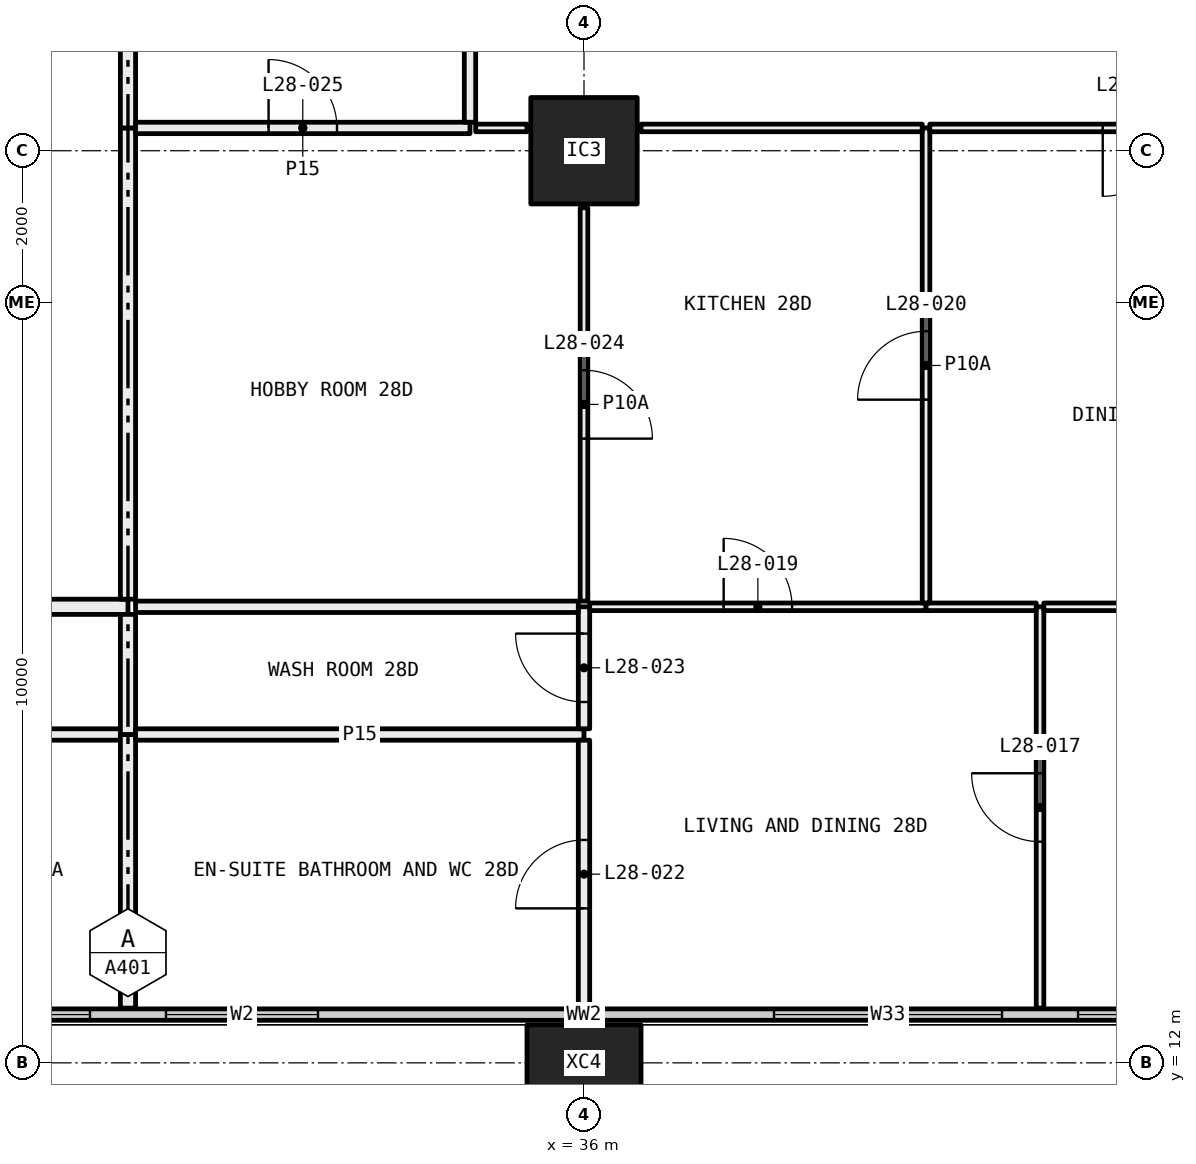
"""IFC4 building model, lengths in metres.
Left out: names, types, materials, properties, quantities, classifications, styles, units other than length and angle.
Written with IfcOpenShell. Run it as: python <this file> out.ifc"""

import sys

from ifc_helpers import new_model, si_unit, direction, frame, frame_2d, origin, origin_2d, place, context, subcontext, project, spatial, rectangle, hollow_rectangle, extrude, element, fill, save


model = new_model("IFC4")
c1 = context("Model", 3, precision=1e-05, world=origin(), true_north=direction((0.0, 1.0)))
c2 = subcontext(c1, "Body", "Model", "MODEL_VIEW")
j1 = project(units=[si_unit("LENGTHUNIT", "METRE"), si_unit("PLANEANGLEUNIT", "RADIAN")], contexts=[c1])
p1 = place(None, origin())
s1 = spatial("IfcSite", under=j1, at=p1, CompositionType="ELEMENT")
p2 = place(p1, origin())
s2 = spatial("IfcBuilding", under=s1, at=p2, CompositionType="ELEMENT")
p3 = place(p2, frame((0.0, 0.0, 110.4)))
s3 = spatial("IfcBuildingStorey", under=s2, at=p3, CompositionType="ELEMENT", Elevation=110.4)
p4 = place(p3, frame((36.0, 12.0, -0.4), z_axis=(0.0, 0.0, 1.0), x_axis=(1.0, 0.0, 0.0)))
e1 = element("IfcColumn", 1, at=p4, inside=s3, PredefinedType="COLUMN", context=c2, shape_type="SweptSolid", body=[
    extrude(hollow_rectangle(XDim=1.5, YDim=1.0, WallThickness=0.06, at=origin_2d()), origin(), (0.0, 0.0, 1.0), 3.45),
])
p5 = place(p3, frame((36.0, 24.0, 0.0), z_axis=(0.0, 0.0, 1.0), x_axis=(1.0, 0.0, 0.0)))
e2 = element("IfcColumn", 2, at=p5, inside=s3, PredefinedType="COLUMN", context=c2, shape_type="SweptSolid", body=[
    extrude(hollow_rectangle(XDim=1.4, YDim=1.4, WallThickness=0.06, at=origin_2d()), origin(), (0.0, 0.0, 1.0), 3.05),
])
p6 = place(p3, frame((6.56, 12.635, 0.0), z_axis=(0.0, 0.0, 1.0), x_axis=(1.0, 0.0, 0.0)))
e3 = element("IfcWall", 3, at=p6, inside=s3, PredefinedType="ELEMENTEDWALL", context=c2, shape_type="SweptSolid", body=[
    extrude(rectangle(XDim=58.88, YDim=0.15, at=frame_2d((29.44, 0.0))), origin(), (0.0, 0.0, 1.0), 3.05),
])
p7 = place(p6, frame((0.44, 0.0, 0.45)))
e4 = element("IfcOpeningElement", 4, at=p7, cuts=e3, PredefinedType="OPENING", context=c2, shape_type="SweptSolid", body=[
    extrude(rectangle(XDim=4.5, YDim=2.55, at=frame_2d((2.25, 1.275))), frame((0.0, 0.085, 0.0), z_axis=(0.0, -1.0, 0.0), x_axis=(1.0, 0.0, 0.0)), (0.0, 0.0, 1.0), 0.17),
])
p8 = place(p6, frame((7.94, 0.0, 0.45)))
e5 = element("IfcOpeningElement", 5, at=p8, cuts=e3, PredefinedType="OPENING", context=c2, shape_type="SweptSolid", body=[
    extrude(rectangle(XDim=3.0, YDim=2.55, at=frame_2d((1.5, 1.275))), frame((0.0, 0.085, 0.0), z_axis=(0.0, -1.0, 0.0), x_axis=(1.0, 0.0, 0.0)), (0.0, 0.0, 1.0), 0.17),
])
p9 = place(p6, frame((11.94, 0.0, 0.45)))
e6 = element("IfcOpeningElement", 6, at=p9, cuts=e3, PredefinedType="OPENING", context=c2, shape_type="SweptSolid", body=[
    extrude(rectangle(XDim=3.0, YDim=2.55, at=frame_2d((1.5, 1.275))), frame((0.0, 0.085, 0.0), z_axis=(0.0, -1.0, 0.0), x_axis=(1.0, 0.0, 0.0)), (0.0, 0.0, 1.0), 0.17),
])
p10 = place(p6, frame((19.94, 0.0, 0.45)))
e7 = element("IfcOpeningElement", 7, at=p10, cuts=e3, PredefinedType="OPENING", context=c2, shape_type="SweptSolid", body=[
    extrude(rectangle(XDim=3.0, YDim=2.55, at=frame_2d((1.5, 1.275))), frame((0.0, 0.085, 0.0), z_axis=(0.0, -1.0, 0.0), x_axis=(1.0, 0.0, 0.0)), (0.0, 0.0, 1.0), 0.17),
])
p11 = place(p6, frame((23.94, 0.0, 0.45)))
e8 = element("IfcOpeningElement", 8, at=p11, cuts=e3, PredefinedType="OPENING", context=c2, shape_type="SweptSolid", body=[
    extrude(rectangle(XDim=2.0, YDim=2.55, at=frame_2d((1.0, 1.275))), frame((0.0, 0.085, 0.0), z_axis=(0.0, -1.0, 0.0), x_axis=(1.0, 0.0, 0.0)), (0.0, 0.0, 1.0), 0.17),
])
p12 = place(p6, frame((31.94, 0.0, 0.45)))
e9 = element("IfcOpeningElement", 9, at=p12, cuts=e3, PredefinedType="OPENING", context=c2, shape_type="SweptSolid", body=[
    extrude(rectangle(XDim=3.0, YDim=2.55, at=frame_2d((1.5, 1.275))), frame((0.0, 0.085, 0.0), z_axis=(0.0, -1.0, 0.0), x_axis=(1.0, 0.0, 0.0)), (0.0, 0.0, 1.0), 0.17),
])
p13 = place(p6, frame((35.94, 0.0, 0.45)))
e10 = element("IfcOpeningElement", 10, at=p13, cuts=e3, PredefinedType="OPENING", context=c2, shape_type="SweptSolid", body=[
    extrude(rectangle(XDim=3.0, YDim=2.55, at=frame_2d((1.5, 1.275))), frame((0.0, 0.085, 0.0), z_axis=(0.0, -1.0, 0.0), x_axis=(1.0, 0.0, 0.0)), (0.0, 0.0, 1.0), 0.17),
])
p14 = place(p6, frame((43.94, 0.0, 0.45)))
e11 = element("IfcOpeningElement", 11, at=p14, cuts=e3, PredefinedType="OPENING", context=c2, shape_type="SweptSolid", body=[
    extrude(rectangle(XDim=3.0, YDim=2.55, at=frame_2d((1.5, 1.275))), frame((0.0, 0.085, 0.0), z_axis=(0.0, -1.0, 0.0), x_axis=(1.0, 0.0, 0.0)), (0.0, 0.0, 1.0), 0.17),
])
p15 = place(p6, frame((47.94, 0.0, 0.45)))
e12 = element("IfcOpeningElement", 12, at=p15, cuts=e3, PredefinedType="OPENING", context=c2, shape_type="SweptSolid", body=[
    extrude(rectangle(XDim=2.0, YDim=2.55, at=frame_2d((1.0, 1.275))), frame((0.0, 0.085, 0.0), z_axis=(0.0, -1.0, 0.0), x_axis=(1.0, 0.0, 0.0)), (0.0, 0.0, 1.0), 0.17),
])
p16 = place(p6, frame((53.94, 0.0, 0.45)))
e13 = element("IfcOpeningElement", 13, at=p16, cuts=e3, PredefinedType="OPENING", context=c2, shape_type="SweptSolid", body=[
    extrude(rectangle(XDim=4.5, YDim=2.55, at=frame_2d((2.25, 1.275))), frame((0.0, 0.085, 0.0), z_axis=(0.0, -1.0, 0.0), x_axis=(1.0, 0.0, 0.0)), (0.0, 0.0, 1.0), 0.17),
])
p17 = place(p3, frame((29.9, 16.32, 0.0), z_axis=(0.0, 0.0, 1.0), x_axis=(-1.0, 0.0, 0.0)))
e14 = element("IfcWall", 14, at=p17, inside=s3, PredefinedType="PARTITIONING", context=c2, shape_type="SweptSolid", body=[
    extrude(rectangle(XDim=5.825, YDim=0.15, at=frame_2d((2.913, 0.0))), origin(), (0.0, 0.0, 1.0), 3.05),
])
p18 = place(p3, frame((30.0, 12.72, 0.0), z_axis=(0.0, 0.0, 1.0), x_axis=(0.0, 1.0, 0.0)))
e15 = element("IfcWall", 15, at=p18, inside=s3, PredefinedType="PARTITIONING", context=c2, shape_type="SweptSolid", body=[
    extrude(rectangle(XDim=3.6, YDim=0.2, at=frame_2d((1.8, 0.0))), origin(), (0.0, 0.0, 1.0), 3.05),
])
p19 = place(p3, frame((30.0, 18.0, 0.0), z_axis=(0.0, 0.0, 1.0), x_axis=(-1.0, 0.0, 0.0)))
e16 = element("IfcWall", 16, at=p19, inside=s3, PredefinedType="PARTITIONING", context=c2, shape_type="SweptSolid", body=[
    extrude(rectangle(XDim=4.1, YDim=0.2, at=frame_2d((2.05, 0.0))), origin(), (0.0, 0.0, 1.0), 3.05),
])
p20 = place(p3, frame((30.0, 16.32, 0.0), z_axis=(0.0, 0.0, 1.0), x_axis=(0.0, 1.0, 0.0)))
e17 = element("IfcWall", 17, at=p20, inside=s3, PredefinedType="PARTITIONING", context=c2, shape_type="SweptSolid", body=[
    extrude(rectangle(XDim=1.58, YDim=0.2, at=frame_2d((0.79, 0.0))), origin(), (0.0, 0.0, 1.0), 3.05),
])
p21 = place(p3, frame((30.0, 18.1, 0.0), z_axis=(0.0, 0.0, 1.0), x_axis=(0.0, 1.0, 0.0)))
e18 = element("IfcWall", 18, at=p21, inside=s3, PredefinedType="PARTITIONING", context=c2, shape_type="SweptSolid", body=[
    extrude(rectangle(XDim=6.2, YDim=0.2, at=frame_2d((3.1, 0.0))), origin(), (0.0, 0.0, 1.0), 2.45),
])
p22 = place(p3, frame((30.0, 24.3, 0.0), z_axis=(0.0, 0.0, 1.0), x_axis=(0.0, 1.0, 0.0)))
e19 = element("IfcWall", 19, at=p22, inside=s3, PredefinedType="PARTITIONING", context=c2, shape_type="SweptSolid", body=[
    extrude(rectangle(XDim=4.5, YDim=0.2, at=frame_2d((2.25, 0.0))), origin(), (0.0, 0.0, 1.0), 3.05),
])
p23 = place(p3, frame((36.0, 16.32, 0.0), z_axis=(0.0, 0.0, 1.0), x_axis=(-1.0, 0.0, 0.0)))
e20 = element("IfcWall", 20, at=p23, inside=s3, PredefinedType="PARTITIONING", context=c2, shape_type="SweptSolid", body=[
    extrude(rectangle(XDim=5.9, YDim=0.15, at=frame_2d((2.95, 0.0))), origin(), (0.0, 0.0, 1.0), 2.45),
])
p24 = place(p3, frame((36.0, 12.72, 0.0), z_axis=(0.0, 0.0, 1.0), x_axis=(0.0, 1.0, 0.0)))
e21 = element("IfcWall", 21, at=p24, inside=s3, PredefinedType="PARTITIONING", context=c2, shape_type="SweptSolid", body=[
    extrude(rectangle(XDim=3.525, YDim=0.15, at=frame_2d((1.763, 0.0))), origin(), (0.0, 0.0, 1.0), 2.45),
])
p25 = place(p24, frame((1.312, 0.0, 0.0)))
e22 = element("IfcOpeningElement", 22, at=p25, cuts=e21, PredefinedType="OPENING", context=c2, shape_type="SweptSolid", body=[
    extrude(rectangle(XDim=0.9, YDim=2.1, at=frame_2d((0.45, 1.05))), frame((0.0, 0.085, 0.0), z_axis=(0.0, -1.0, 0.0), x_axis=(1.0, 0.0, 0.0)), (0.0, 0.0, 1.0), 0.17),
])
p26 = place(p3, frame((36.0, 16.395, 0.0), z_axis=(0.0, 0.0, 1.0), x_axis=(0.0, 1.0, 0.0)))
e23 = element("IfcWall", 23, at=p26, inside=s3, PredefinedType="PARTITIONING", context=c2, shape_type="SweptSolid", body=[
    extrude(rectangle(XDim=1.605, YDim=0.15, at=frame_2d((0.802, 0.0))), origin(), (0.0, 0.0, 1.0), 2.45),
])
p27 = place(p26, frame((0.353, 0.0, 0.0)))
e24 = element("IfcOpeningElement", 24, at=p27, cuts=e23, PredefinedType="OPENING", context=c2, shape_type="SweptSolid", body=[
    extrude(rectangle(XDim=0.9, YDim=2.1, at=frame_2d((0.45, 1.05))), frame((0.0, 0.085, 0.0), z_axis=(0.0, -1.0, 0.0), x_axis=(1.0, 0.0, 0.0)), (0.0, 0.0, 1.0), 0.17),
])
p28 = place(p3, frame((35.925, 18.0, 0.0), z_axis=(0.0, 0.0, 1.0), x_axis=(-1.0, 0.0, 0.0)))
e25 = element("IfcWall", 25, at=p28, inside=s3, PredefinedType="PARTITIONING", context=c2, shape_type="SweptSolid", body=[
    extrude(rectangle(XDim=5.825, YDim=0.15, at=frame_2d((2.913, 0.0))), origin(), (0.0, 0.0, 1.0), 2.45),
])
p29 = place(p3, frame((42.0, 12.72, 0.0), z_axis=(0.0, 0.0, 1.0), x_axis=(0.0, 1.0, 0.0)))
e26 = element("IfcWall", 26, at=p29, inside=s3, PredefinedType="PARTITIONING", context=c2, shape_type="SweptSolid", body=[
    extrude(rectangle(XDim=5.28, YDim=0.1, at=frame_2d((2.64, 0.0))), origin(), (0.0, 0.0, 1.0), 3.05),
])
p30 = place(p29, frame((2.19, 0.0, 0.0)))
e27 = element("IfcOpeningElement", 27, at=p30, cuts=e26, PredefinedType="OPENING", context=c2, shape_type="SweptSolid", body=[
    extrude(rectangle(XDim=0.9, YDim=2.1, at=frame_2d((0.45, 1.05))), frame((0.0, 0.06, 0.0), z_axis=(0.0, -1.0, 0.0), x_axis=(1.0, 0.0, 0.0)), (0.0, 0.0, 1.0), 0.12),
])
p31 = place(p3, frame((40.5, 18.0, 0.0), z_axis=(0.0, 0.0, 1.0), x_axis=(-1.0, 0.0, 0.0)))
e28 = element("IfcWall", 28, at=p31, inside=s3, PredefinedType="PARTITIONING", context=c2, shape_type="SweptSolid", body=[
    extrude(rectangle(XDim=4.425, YDim=0.1, at=frame_2d((2.212, 0.0))), origin(), (0.0, 0.0, 1.0), 2.45),
])
p32 = place(p31, frame((1.762, 0.0, 0.0)))
e29 = element("IfcOpeningElement", 29, at=p32, cuts=e28, PredefinedType="OPENING", context=c2, shape_type="SweptSolid", body=[
    extrude(rectangle(XDim=0.9, YDim=2.1, at=frame_2d((0.45, 1.05))), frame((0.0, 0.06, 0.0), z_axis=(0.0, -1.0, 0.0), x_axis=(1.0, 0.0, 0.0)), (0.0, 0.0, 1.0), 0.12),
])
p33 = place(p3, frame((41.95, 18.0, 0.0), z_axis=(0.0, 0.0, 1.0), x_axis=(-1.0, 0.0, 0.0)))
e30 = element("IfcWall", 30, at=p33, inside=s3, PredefinedType="PARTITIONING", context=c2, shape_type="SweptSolid", body=[
    extrude(rectangle(XDim=1.45, YDim=0.1, at=frame_2d((0.725, 0.0))), origin(), (0.0, 0.0, 1.0), 3.05),
])
p34 = place(p3, frame((46.0, 18.0, 0.0), z_axis=(0.0, 0.0, 1.0), x_axis=(-1.0, 0.0, 0.0)))
e31 = element("IfcWall", 31, at=p34, inside=s3, PredefinedType="PARTITIONING", context=c2, shape_type="SweptSolid", body=[
    extrude(rectangle(XDim=3.95, YDim=0.1, at=frame_2d((1.975, 0.0))), origin(), (0.0, 0.0, 1.0), 3.05),
])
p35 = place(p3, frame((36.0, 18.075, 0.0), z_axis=(0.0, 0.0, 1.0), x_axis=(0.0, 1.0, 0.0)))
e32 = element("IfcWall", 32, at=p35, inside=s3, PredefinedType="PARTITIONING", context=c2, shape_type="SweptSolid", body=[
    extrude(rectangle(XDim=5.175, YDim=0.1, at=frame_2d((2.587, 0.0))), origin(), (0.0, 0.0, 1.0), 2.45),
])
p36 = place(p35, frame((2.137, 0.0, 0.0)))
e33 = element("IfcOpeningElement", 33, at=p36, cuts=e32, PredefinedType="OPENING", context=c2, shape_type="SweptSolid", body=[
    extrude(rectangle(XDim=0.9, YDim=2.1, at=frame_2d((0.45, 1.05))), frame((0.0, 0.06, 0.0), z_axis=(0.0, -1.0, 0.0), x_axis=(1.0, 0.0, 0.0)), (0.0, 0.0, 1.0), 0.12),
])
p37 = place(p3, frame((34.5, 24.3, 0.0), z_axis=(0.0, 0.0, 1.0), x_axis=(-1.0, 0.0, 0.0)))
e34 = element("IfcWall", 34, at=p37, inside=s3, PredefinedType="PARTITIONING", context=c2, shape_type="SweptSolid", body=[
    extrude(rectangle(XDim=4.4, YDim=0.15, at=frame_2d((2.2, 0.0))), origin(), (0.0, 0.0, 1.0), 3.05),
])
p38 = place(p37, frame((1.75, 0.0, 0.0)))
e35 = element("IfcOpeningElement", 35, at=p38, cuts=e34, PredefinedType="OPENING", context=c2, shape_type="SweptSolid", body=[
    extrude(rectangle(XDim=0.9, YDim=2.1, at=frame_2d((0.45, 1.05))), frame((0.0, 0.085, 0.0), z_axis=(0.0, -1.0, 0.0), x_axis=(1.0, 0.0, 0.0)), (0.0, 0.0, 1.0), 0.17),
])
p39 = place(p3, frame((35.25, 24.3, 0.0), z_axis=(0.0, 0.0, 1.0), x_axis=(-1.0, 0.0, 0.0)))
e36 = element("IfcWall", 36, at=p39, inside=s3, PredefinedType="PARTITIONING", context=c2, shape_type="SweptSolid", body=[
    extrude(rectangle(XDim=0.675, YDim=0.1, at=frame_2d((0.337, 0.0))), origin(), (0.0, 0.0, 1.0), 3.05),
])
p40 = place(p3, frame((40.5, 18.05, 0.0), z_axis=(0.0, 0.0, 1.0), x_axis=(0.0, 1.0, 0.0)))
e37 = element("IfcWall", 37, at=p40, inside=s3, PredefinedType="PARTITIONING", context=c2, shape_type="SweptSolid", body=[
    extrude(rectangle(XDim=6.25, YDim=0.1, at=frame_2d((3.125, 0.0))), origin(), (0.0, 0.0, 1.0), 2.45),
])
p41 = place(p40, frame((2.675, 0.0, 0.0)))
e38 = element("IfcOpeningElement", 38, at=p41, cuts=e37, PredefinedType="OPENING", context=c2, shape_type="SweptSolid", body=[
    extrude(rectangle(XDim=0.9, YDim=2.1, at=frame_2d((0.45, 1.05))), frame((0.0, 0.06, 0.0), z_axis=(0.0, -1.0, 0.0), x_axis=(1.0, 0.0, 0.0)), (0.0, 0.0, 1.0), 0.12),
])
p42 = place(p3, frame((40.45, 24.3, 0.0), z_axis=(0.0, 0.0, 1.0), x_axis=(-1.0, 0.0, 0.0)))
e39 = element("IfcWall", 39, at=p42, inside=s3, PredefinedType="PARTITIONING", context=c2, shape_type="SweptSolid", body=[
    extrude(rectangle(XDim=3.7, YDim=0.1, at=frame_2d((1.85, 0.0))), origin(), (0.0, 0.0, 1.0), 3.05),
])
p43 = place(p3, frame((46.0, 24.3, 0.0), z_axis=(0.0, 0.0, 1.0), x_axis=(-1.0, 0.0, 0.0)))
e40 = element("IfcWall", 40, at=p43, inside=s3, PredefinedType="PARTITIONING", context=c2, shape_type="SweptSolid", body=[
    extrude(rectangle(XDim=5.45, YDim=0.1, at=frame_2d((2.725, 0.0))), origin(), (0.0, 0.0, 1.0), 3.05),
])
p44 = place(p43, frame((2.275, 0.0, 0.0)))
e41 = element("IfcOpeningElement", 41, at=p44, cuts=e40, PredefinedType="OPENING", context=c2, shape_type="SweptSolid", body=[
    extrude(rectangle(XDim=0.9, YDim=2.1, at=frame_2d((0.45, 1.05))), frame((0.0, 0.06, 0.0), z_axis=(0.0, -1.0, 0.0), x_axis=(1.0, 0.0, 0.0)), (0.0, 0.0, 1.0), 0.12),
])
p45 = place(p3, frame((34.5, 24.375, 0.0), z_axis=(0.0, 0.0, 1.0), x_axis=(0.0, 1.0, 0.0)))
e42 = element("IfcWall", 42, at=p45, inside=s3, PredefinedType="PARTITIONING", context=c2, shape_type="SweptSolid", body=[
    extrude(rectangle(XDim=4.325, YDim=0.15, at=frame_2d((2.163, 0.0))), origin(), (0.0, 0.0, 1.0), 3.05),
])
p46 = place(p10, origin())
e43 = element("IfcWindow", 43, at=p46, inside=s3, PartitioningType="SINGLE_PANEL", PredefinedType="WINDOW", context=c2, shape_type="SweptSolid", body=[
    extrude(rectangle(XDim=3.0, YDim=2.55, at=frame_2d((1.5, 1.275))), frame((0.0, 0.03, 0.0), z_axis=(0.0, -1.0, 0.0), x_axis=(1.0, 0.0, 0.0)), (0.0, 0.0, 1.0), 0.06),
])
fill(e7, e43)
p47 = place(p11, origin())
e44 = element("IfcWindow", 44, at=p47, inside=s3, PartitioningType="SINGLE_PANEL", PredefinedType="WINDOW", context=c2, shape_type="SweptSolid", body=[
    extrude(rectangle(XDim=2.0, YDim=2.55, at=frame_2d((1.0, 1.275))), frame((0.0, 0.03, 0.0), z_axis=(0.0, -1.0, 0.0), x_axis=(1.0, 0.0, 0.0)), (0.0, 0.0, 1.0), 0.06),
])
fill(e8, e44)
p48 = place(p12, origin())
e45 = element("IfcWindow", 45, at=p48, inside=s3, PartitioningType="SINGLE_PANEL", PredefinedType="WINDOW", context=c2, shape_type="SweptSolid", body=[
    extrude(rectangle(XDim=3.0, YDim=2.55, at=frame_2d((1.5, 1.275))), frame((0.0, 0.03, 0.0), z_axis=(0.0, -1.0, 0.0), x_axis=(1.0, 0.0, 0.0)), (0.0, 0.0, 1.0), 0.06),
])
fill(e9, e45)
p49 = place(p13, origin())
e46 = element("IfcWindow", 46, at=p49, inside=s3, PartitioningType="SINGLE_PANEL", PredefinedType="WINDOW", context=c2, shape_type="SweptSolid", body=[
    extrude(rectangle(XDim=3.0, YDim=2.55, at=frame_2d((1.5, 1.275))), frame((0.0, 0.03, 0.0), z_axis=(0.0, -1.0, 0.0), x_axis=(1.0, 0.0, 0.0)), (0.0, 0.0, 1.0), 0.06),
])
fill(e10, e46)
p50 = place(p30, origin())
e47 = element("IfcDoor", 47, at=p50, inside=s3, OperationType="SINGLE_SWING_LEFT", PredefinedType="DOOR", context=c2, shape_type="SweptSolid", body=[
    extrude(rectangle(XDim=0.9, YDim=2.1, at=frame_2d((0.45, 1.05))), frame((0.0, 0.025, 0.0), z_axis=(0.0, -1.0, 0.0), x_axis=(1.0, 0.0, 0.0)), (0.0, 0.0, 1.0), 0.05),
])
fill(e27, e47)
p51 = place(p32, frame((0.9, 0.0, 0.0), x_axis=(-1.0, 0.0, 0.0)))
e48 = element("IfcDoor", 48, at=p51, inside=s3, OperationType="SINGLE_SWING_RIGHT", PredefinedType="DOOR", context=c2, shape_type="SweptSolid", body=[
    extrude(rectangle(XDim=0.9, YDim=2.1, at=frame_2d((0.45, 1.05))), frame((0.0, 0.025, 0.0), z_axis=(0.0, -1.0, 0.0), x_axis=(1.0, 0.0, 0.0)), (0.0, 0.0, 1.0), 0.05),
])
fill(e29, e48)
p52 = place(p41, origin())
e49 = element("IfcDoor", 49, at=p52, inside=s3, OperationType="SINGLE_SWING_RIGHT", PredefinedType="DOOR", context=c2, shape_type="SweptSolid", body=[
    extrude(rectangle(XDim=0.9, YDim=2.1, at=frame_2d((0.45, 1.05))), frame((0.0, 0.025, 0.0), z_axis=(0.0, -1.0, 0.0), x_axis=(1.0, 0.0, 0.0)), (0.0, 0.0, 1.0), 0.05),
])
fill(e38, e49)
p53 = place(p44, origin())
e50 = element("IfcDoor", 50, at=p53, inside=s3, OperationType="SINGLE_SWING_LEFT", PredefinedType="DOOR", context=c2, shape_type="SweptSolid", body=[
    extrude(rectangle(XDim=0.9, YDim=2.1, at=frame_2d((0.45, 1.05))), frame((0.0, 0.025, 0.0), z_axis=(0.0, -1.0, 0.0), x_axis=(1.0, 0.0, 0.0)), (0.0, 0.0, 1.0), 0.05),
])
fill(e41, e50)
p54 = place(p25, origin())
e51 = element("IfcDoor", 51, at=p54, inside=s3, OperationType="SINGLE_SWING_RIGHT", PredefinedType="DOOR", context=c2, shape_type="SweptSolid", body=[
    extrude(rectangle(XDim=0.9, YDim=2.1, at=frame_2d((0.45, 1.05))), frame((0.0, 0.025, 0.0), z_axis=(0.0, -1.0, 0.0), x_axis=(1.0, 0.0, 0.0)), (0.0, 0.0, 1.0), 0.05),
])
fill(e22, e51)
p55 = place(p27, origin())
e52 = element("IfcDoor", 52, at=p55, inside=s3, OperationType="SINGLE_SWING_LEFT", PredefinedType="DOOR", context=c2, shape_type="SweptSolid", body=[
    extrude(rectangle(XDim=0.9, YDim=2.1, at=frame_2d((0.45, 1.05))), frame((0.0, 0.025, 0.0), z_axis=(0.0, -1.0, 0.0), x_axis=(1.0, 0.0, 0.0)), (0.0, 0.0, 1.0), 0.05),
])
fill(e24, e52)
p56 = place(p36, frame((0.9, 0.0, 0.0), x_axis=(-1.0, 0.0, 0.0)))
e53 = element("IfcDoor", 53, at=p56, inside=s3, OperationType="SINGLE_SWING_LEFT", PredefinedType="DOOR", context=c2, shape_type="SweptSolid", body=[
    extrude(rectangle(XDim=0.9, YDim=2.1, at=frame_2d((0.45, 1.05))), frame((0.0, 0.025, 0.0), z_axis=(0.0, -1.0, 0.0), x_axis=(1.0, 0.0, 0.0)), (0.0, 0.0, 1.0), 0.05),
])
fill(e33, e53)
p57 = place(p38, frame((0.9, 0.0, 0.0), x_axis=(-1.0, 0.0, 0.0)))
e54 = element("IfcDoor", 54, at=p57, inside=s3, OperationType="SINGLE_SWING_RIGHT", PredefinedType="DOOR", context=c2, shape_type="SweptSolid", body=[
    extrude(rectangle(XDim=0.9, YDim=2.1, at=frame_2d((0.45, 1.05))), frame((0.0, 0.025, 0.0), z_axis=(0.0, -1.0, 0.0), x_axis=(1.0, 0.0, 0.0)), (0.0, 0.0, 1.0), 0.05),
])
fill(e35, e54)
save(model, sys.argv[1])
